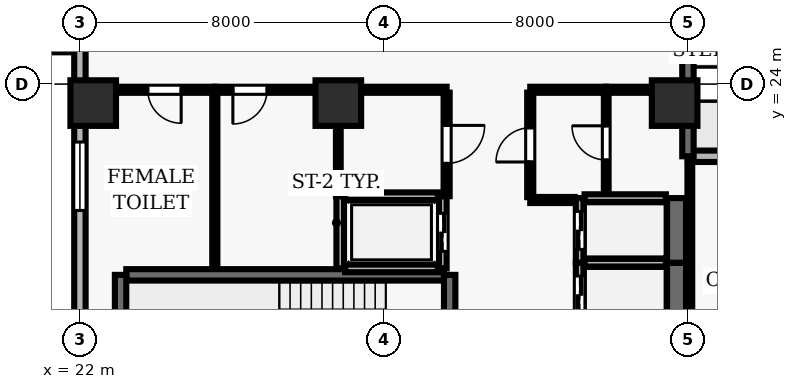
"""IFC4 building model, lengths in metres.
Left out: names, types, materials, properties, quantities, classifications, styles, units other than length and angle.
Written with IfcOpenShell. Run it as: python <this file> out.ifc"""

import sys

from ifc_helpers import new_model, si_unit, direction, frame, frame_2d, origin, origin_2d, place, context, subcontext, project, spatial, rectangle, extrude, element, fill, save


model = new_model("IFC4")
c1 = context("Model", 3, precision=1e-05, world=origin(), true_north=direction((0.0, 1.0)))
c2 = subcontext(c1, "Body", "Model", "MODEL_VIEW")
j1 = project(units=[si_unit("LENGTHUNIT", "METRE"), si_unit("PLANEANGLEUNIT", "RADIAN")], contexts=[c1])
p1 = place(None, origin())
s1 = spatial("IfcSite", under=j1, at=p1, CompositionType="ELEMENT")
p2 = place(p1, origin())
s2 = spatial("IfcBuilding", under=s1, at=p2, CompositionType="ELEMENT")
p3 = place(p2, frame((0.0, 0.0, 158.0)))
s3 = spatial("IfcBuildingStorey", under=s2, at=p3, CompositionType="ELEMENT", Elevation=158.0)
for number, where, z_axis, x_axis in (
    (1, (22.35, 23.5, 0.0), (0.0, 0.0, 1.0), (1.0, 0.0, 0.0)),
    (2, (28.8, 23.5, 0.0), (0.0, 0.0, 1.0), (1.0, 0.0, 0.0)),
    (3, (37.65, 23.5, 0.0), (0.0, 0.0, 1.0), (1.0, 0.0, 0.0)),
):
    element("IfcColumn", number, at=place(p3, frame(where, z_axis=z_axis, x_axis=x_axis)), inside=s3, PredefinedType="COLUMN", context=c2, shape_type="SweptSolid", body=[
        extrude(rectangle(XDim=1.2, YDim=1.2, at=origin_2d()), origin(), (0.0, 0.0, 1.0), 3.9),
    ])
p4 = place(p3, frame((43.541, 22.1, 0.0), z_axis=(0.0, 0.0, 1.0), x_axis=(-1.0, 0.0, 0.0)))
e4 = element("IfcWall", 4, at=p4, inside=s3, PredefinedType="SOLIDWALL", context=c2, shape_type="SweptSolid", body=[
    extrude(rectangle(XDim=5.541, YDim=0.3, at=frame_2d((2.771, 0.0))), origin(), (0.0, 0.0, 1.0), 3.69),
])
p5 = place(p4, frame((2.095, 0.0, 0.0)))
e5 = element("IfcOpeningElement", 5, at=p5, cuts=e4, PredefinedType="OPENING", context=c2, shape_type="SweptSolid", body=[
    extrude(rectangle(XDim=1.35, YDim=2.2, at=frame_2d((0.675, 1.1))), frame((0.0, 0.16, 0.0), z_axis=(0.0, -1.0, 0.0), x_axis=(1.0, 0.0, 0.0)), (0.0, 0.0, 1.0), 0.32),
])
p6 = place(p3, frame((38.0, 22.1, 0.0), z_axis=(0.0, 0.0, 1.0), x_axis=(0.0, 1.0, 0.0)))
e6 = element("IfcWall", 6, at=p6, inside=s3, PredefinedType="SOLIDWALL", context=c2, shape_type="SweptSolid", body=[
    extrude(rectangle(XDim=24.0, YDim=0.3, at=frame_2d((12.0, 0.0))), origin(), (0.0, 0.0, 1.0), 3.69),
])
p7 = place(p6, frame((10.125, 0.0, 0.0)))
e7 = element("IfcOpeningElement", 7, at=p7, cuts=e6, PredefinedType="OPENING", context=c2, shape_type="SweptSolid", body=[
    extrude(rectangle(XDim=1.0, YDim=2.2, at=frame_2d((0.5, 1.1))), frame((0.0, 0.16, 0.0), z_axis=(0.0, -1.0, 0.0), x_axis=(1.0, 0.0, 0.0)), (0.0, 0.0, 1.0), 0.32),
])
p8 = place(p6, frame((14.25, 0.0, 0.9)))
e8 = element("IfcOpeningElement", 8, at=p8, cuts=e6, PredefinedType="OPENING", context=c2, shape_type="SweptSolid", body=[
    extrude(rectangle(XDim=2.4, YDim=2.2, at=frame_2d((1.2, 1.1))), frame((0.0, 0.16, 0.0), z_axis=(0.0, -1.0, 0.0), x_axis=(1.0, 0.0, 0.0)), (0.0, 0.0, 1.0), 0.32),
])
p9 = place(p6, frame((19.8, 0.0, 0.9)))
e9 = element("IfcOpeningElement", 9, at=p9, cuts=e6, PredefinedType="OPENING", context=c2, shape_type="SweptSolid", body=[
    extrude(rectangle(XDim=2.4, YDim=2.2, at=frame_2d((1.2, 1.1))), frame((0.0, 0.16, 0.0), z_axis=(0.0, -1.0, 0.0), x_axis=(1.0, 0.0, 0.0)), (0.0, 0.0, 1.0), 0.32),
])
p10 = place(p3, frame((22.0, 46.1, 0.0), z_axis=(0.0, 0.0, 1.0), x_axis=(0.0, -1.0, 0.0)))
e10 = element("IfcWall", 10, at=p10, inside=s3, PredefinedType="SOLIDWALL", context=c2, shape_type="SweptSolid", body=[
    extrude(rectangle(XDim=43.6, YDim=0.3, at=frame_2d((21.8, 0.0))), origin(), (0.0, 0.0, 1.0), 3.69),
])
p11 = place(p10, frame((7.1, 0.0, 0.0)))
e11 = element("IfcOpeningElement", 11, at=p11, cuts=e10, PredefinedType="OPENING", context=c2, shape_type="SweptSolid", body=[
    extrude(rectangle(XDim=1.0, YDim=2.2, at=frame_2d((0.5, 1.1))), frame((0.0, 0.16, 0.0), z_axis=(0.0, -1.0, 0.0), x_axis=(1.0, 0.0, 0.0)), (0.0, 0.0, 1.0), 0.32),
])
p12 = place(p10, frame((1.825, 0.0, 0.9)))
e12 = element("IfcOpeningElement", 12, at=p12, cuts=e10, PredefinedType="OPENING", context=c2, shape_type="SweptSolid", body=[
    extrude(rectangle(XDim=1.8, YDim=1.6, at=frame_2d((0.9, 0.8))), frame((0.0, 0.16, 0.0), z_axis=(0.0, -1.0, 0.0), x_axis=(1.0, 0.0, 0.0)), (0.0, 0.0, 1.0), 0.32),
])
p13 = place(p10, frame((13.625, 0.0, 0.9)))
e13 = element("IfcOpeningElement", 13, at=p13, cuts=e10, PredefinedType="OPENING", context=c2, shape_type="SweptSolid", body=[
    extrude(rectangle(XDim=1.8, YDim=1.6, at=frame_2d((0.9, 0.8))), frame((0.0, 0.16, 0.0), z_axis=(0.0, -1.0, 0.0), x_axis=(1.0, 0.0, 0.0)), (0.0, 0.0, 1.0), 0.32),
])
p14 = place(p10, frame((17.725, 0.0, 0.9)))
e14 = element("IfcOpeningElement", 14, at=p14, cuts=e10, PredefinedType="OPENING", context=c2, shape_type="SweptSolid", body=[
    extrude(rectangle(XDim=1.8, YDim=1.6, at=frame_2d((0.9, 0.8))), frame((0.0, 0.16, 0.0), z_axis=(0.0, -1.0, 0.0), x_axis=(1.0, 0.0, 0.0)), (0.0, 0.0, 1.0), 0.32),
])
p15 = place(p10, frame((23.625, 0.0, 0.9)))
e15 = element("IfcOpeningElement", 15, at=p15, cuts=e10, PredefinedType="OPENING", context=c2, shape_type="SweptSolid", body=[
    extrude(rectangle(XDim=1.8, YDim=1.6, at=frame_2d((0.9, 0.8))), frame((0.0, 0.16, 0.0), z_axis=(0.0, -1.0, 0.0), x_axis=(1.0, 0.0, 0.0)), (0.0, 0.0, 1.0), 0.32),
])
p16 = place(p10, frame((28.625, 0.0, 0.9)))
e16 = element("IfcOpeningElement", 16, at=p16, cuts=e10, PredefinedType="OPENING", context=c2, shape_type="SweptSolid", body=[
    extrude(rectangle(XDim=1.8, YDim=1.6, at=frame_2d((0.9, 0.8))), frame((0.0, 0.16, 0.0), z_axis=(0.0, -1.0, 0.0), x_axis=(1.0, 0.0, 0.0)), (0.0, 0.0, 1.0), 0.32),
])
p17 = place(p10, frame((34.525, 0.0, 0.9)))
e17 = element("IfcOpeningElement", 17, at=p17, cuts=e10, PredefinedType="OPENING", context=c2, shape_type="SweptSolid", body=[
    extrude(rectangle(XDim=1.8, YDim=1.6, at=frame_2d((0.9, 0.8))), frame((0.0, 0.16, 0.0), z_axis=(0.0, -1.0, 0.0), x_axis=(1.0, 0.0, 0.0)), (0.0, 0.0, 1.0), 0.32),
])
p18 = place(p3, frame((31.58, 18.98, 0.0), z_axis=(0.0, 0.0, 1.0), x_axis=(-1.0, 0.0, 0.0)))
e18 = element("IfcWall", 18, at=p18, inside=s3, PredefinedType="SHEAR", context=c2, shape_type="SweptSolid", body=[
    extrude(rectangle(XDim=8.36, YDim=0.3, at=frame_2d((4.18, 0.0))), origin(), (0.0, 0.0, 1.0), 3.69),
])
p19 = place(p3, frame((23.07, 18.98, 0.0), z_axis=(0.0, 0.0, 1.0), x_axis=(0.0, -1.0, 0.0)))
e19 = element("IfcWall", 19, at=p19, inside=s3, PredefinedType="SHEAR", context=c2, shape_type="SweptSolid", body=[
    extrude(rectangle(XDim=3.51, YDim=0.3, at=frame_2d((1.755, 0.0))), origin(), (0.0, 0.0, 1.0), 3.69),
])
p20 = place(p3, frame((31.73, 15.47, 0.0), z_axis=(0.0, 0.0, 1.0), x_axis=(0.0, 1.0, 0.0)))
e20 = element("IfcWall", 20, at=p20, inside=s3, PredefinedType="SHEAR", context=c2, shape_type="SweptSolid", body=[
    extrude(rectangle(XDim=3.51, YDim=0.3, at=frame_2d((1.755, 0.0))), origin(), (0.0, 0.0, 1.0), 3.69),
])
p21 = place(p20, frame((1.18, 0.0, 0.0)))
e21 = element("IfcOpeningElement", 21, at=p21, cuts=e20, PredefinedType="OPENING", context=c2, shape_type="SweptSolid", body=[
    extrude(rectangle(XDim=1.15, YDim=2.15, at=frame_2d((0.575, 1.075))), frame((0.0, 0.16, 0.0), z_axis=(0.0, -1.0, 0.0), x_axis=(1.0, 0.0, 0.0)), (0.0, 0.0, 1.0), 0.32),
])
p22 = place(p3, frame((35.15, 19.3, 0.0), z_axis=(0.0, 0.0, 1.0), x_axis=(0.0, -1.0, 0.0)))
e22 = element("IfcWall", 22, at=p22, inside=s3, PredefinedType="SOLIDWALL", context=c2, shape_type="SweptSolid", body=[
    extrude(rectangle(XDim=1.7, YDim=0.2, at=frame_2d((0.85, 0.0))), origin(), (0.0, 0.0, 1.0), 3.69),
])
p23 = place(p22, frame((0.35, 0.0, 0.0)))
e23 = element("IfcOpeningElement", 23, at=p23, cuts=e22, PredefinedType="OPENING", context=c2, shape_type="SweptSolid", body=[
    extrude(rectangle(XDim=1.0, YDim=2.1, at=frame_2d((0.5, 1.05))), frame((0.0, 0.11, 0.0), z_axis=(0.0, -1.0, 0.0), x_axis=(1.0, 0.0, 0.0)), (0.0, 0.0, 1.0), 0.22),
])
p24 = place(p3, frame((37.7, 17.6, 0.0), z_axis=(0.0, 0.0, 1.0), x_axis=(0.0, 1.0, 0.0)))
e24 = element("IfcWall", 24, at=p24, inside=s3, PredefinedType="SHEAR", context=c2, shape_type="SweptSolid", body=[
    extrude(rectangle(XDim=1.7, YDim=0.5, at=frame_2d((0.85, 0.0))), origin(), (0.0, 0.0, 1.0), 3.69),
])
p25 = place(p3, frame((37.42, 19.3, 0.0), z_axis=(0.0, 0.0, 1.0), x_axis=(-1.0, 0.0, 0.0)))
e25 = element("IfcWall", 25, at=p25, inside=s3, PredefinedType="SOLIDWALL", context=c2, shape_type="SweptSolid", body=[
    extrude(rectangle(XDim=2.14, YDim=0.2, at=frame_2d((1.07, 0.0))), origin(), (0.0, 0.0, 1.0), 3.69),
])
p26 = place(p3, frame((35.15, 21.0, 0.0), z_axis=(0.0, 0.0, 1.0), x_axis=(0.0, -1.0, 0.0)))
e26 = element("IfcWall", 26, at=p26, inside=s3, PredefinedType="SOLIDWALL", context=c2, shape_type="SweptSolid", body=[
    extrude(rectangle(XDim=1.7, YDim=0.2, at=frame_2d((0.85, 0.0))), origin(), (0.0, 0.0, 1.0), 3.69),
])
p27 = place(p26, frame((0.35, 0.0, 0.0)))
e27 = element("IfcOpeningElement", 27, at=p27, cuts=e26, PredefinedType="OPENING", context=c2, shape_type="SweptSolid", body=[
    extrude(rectangle(XDim=1.0, YDim=2.1, at=frame_2d((0.5, 1.05))), frame((0.0, 0.11, 0.0), z_axis=(0.0, -1.0, 0.0), x_axis=(1.0, 0.0, 0.0)), (0.0, 0.0, 1.0), 0.22),
])
p28 = place(p3, frame((37.7, 19.3, 0.0), z_axis=(0.0, 0.0, 1.0), x_axis=(0.0, 1.0, 0.0)))
e28 = element("IfcWall", 28, at=p28, inside=s3, PredefinedType="SHEAR", context=c2, shape_type="SweptSolid", body=[
    extrude(rectangle(XDim=1.7, YDim=0.5, at=frame_2d((0.85, 0.0))), origin(), (0.0, 0.0, 1.0), 3.69),
])
p29 = place(p3, frame((37.42, 21.0, 0.0), z_axis=(0.0, 0.0, 1.0), x_axis=(-1.0, 0.0, 0.0)))
e29 = element("IfcWall", 29, at=p29, inside=s3, PredefinedType="SOLIDWALL", context=c2, shape_type="SweptSolid", body=[
    extrude(rectangle(XDim=2.14, YDim=0.2, at=frame_2d((1.07, 0.0))), origin(), (0.0, 0.0, 1.0), 3.69),
])
p30 = place(p3, frame((28.85, 21.05, 0.0), z_axis=(0.0, 0.0, 1.0), x_axis=(0.0, -1.0, 0.0)))
e30 = element("IfcWall", 30, at=p30, inside=s3, PredefinedType="SOLIDWALL", context=c2, shape_type="SweptSolid", body=[
    extrude(rectangle(XDim=1.9, YDim=0.2, at=frame_2d((0.95, 0.0))), origin(), (0.0, 0.0, 1.0), 3.69),
])
p31 = place(p3, frame((31.55, 19.15, 0.0), z_axis=(0.0, 0.0, 1.0), x_axis=(0.0, 1.0, 0.0)))
e31 = element("IfcWall", 31, at=p31, inside=s3, PredefinedType="SOLIDWALL", context=c2, shape_type="SweptSolid", body=[
    extrude(rectangle(XDim=1.9, YDim=0.2, at=frame_2d((0.95, 0.0))), origin(), (0.0, 0.0, 1.0), 3.69),
])
p32 = place(p31, frame((0.45, 0.0, 0.0)))
e32 = element("IfcOpeningElement", 32, at=p32, cuts=e31, PredefinedType="OPENING", context=c2, shape_type="SweptSolid", body=[
    extrude(rectangle(XDim=1.0, YDim=2.1, at=frame_2d((0.5, 1.05))), frame((0.0, 0.11, 0.0), z_axis=(0.0, -1.0, 0.0), x_axis=(1.0, 0.0, 0.0)), (0.0, 0.0, 1.0), 0.22),
])
for number, where, z_axis, x_axis in (
    (33, (28.98, 19.15, 0.0), (0.0, 0.0, 1.0), (1.0, 0.0, 0.0)),
    (34, (31.42, 21.05, 0.0), (0.0, 0.0, 1.0), (-1.0, 0.0, 0.0)),
):
    element("IfcWall", number, at=place(p3, frame(where, z_axis=z_axis, x_axis=x_axis)), inside=s3, PredefinedType="SOLIDWALL", context=c2, shape_type="SweptSolid", body=[
        extrude(rectangle(XDim=2.44, YDim=0.2, at=frame_2d((1.22, 0.0))), origin(), (0.0, 0.0, 1.0), 3.69),
    ])
p33 = place(p3, frame((25.55, 23.85, 0.0), z_axis=(0.0, 0.0, 1.0), x_axis=(-1.0, 0.0, 0.0)))
e35 = element("IfcWall", 35, at=p33, inside=s3, PredefinedType="PARTITIONING", context=c2, shape_type="SweptSolid", body=[
    extrude(rectangle(XDim=3.35, YDim=0.16, at=frame_2d((1.675, 0.0))), origin(), (0.0, 0.0, 1.0), 3.074),
])
p34 = place(p33, frame((0.885, 0.0, 0.0)))
e36 = element("IfcOpeningElement", 36, at=p34, cuts=e35, PredefinedType="OPENING", context=c2, shape_type="SweptSolid", body=[
    extrude(rectangle(XDim=0.88, YDim=2.1, at=frame_2d((0.44, 1.05))), frame((0.0, 0.09, 0.0), z_axis=(0.0, -1.0, 0.0), x_axis=(1.0, 0.0, 0.0)), (0.0, 0.0, 1.0), 0.18),
])
p35 = place(p3, frame((28.8, 23.85, 0.0), z_axis=(0.0, 0.0, 1.0), x_axis=(-1.0, 0.0, 0.0)))
e37 = element("IfcWall", 37, at=p35, inside=s3, PredefinedType="PARTITIONING", context=c2, shape_type="SweptSolid", body=[
    extrude(rectangle(XDim=3.25, YDim=0.16, at=frame_2d((1.625, 0.0))), origin(), (0.0, 0.0, 1.0), 3.074),
])
p36 = place(p35, frame((1.875, 0.0, 0.0)))
e38 = element("IfcOpeningElement", 38, at=p36, cuts=e37, PredefinedType="OPENING", context=c2, shape_type="SweptSolid", body=[
    extrude(rectangle(XDim=0.9, YDim=2.1, at=frame_2d((0.45, 1.05))), frame((0.0, 0.09, 0.0), z_axis=(0.0, -1.0, 0.0), x_axis=(1.0, 0.0, 0.0)), (0.0, 0.0, 1.0), 0.18),
])
p37 = place(p3, frame((31.65, 23.85, 0.0), z_axis=(0.0, 0.0, 1.0), x_axis=(-1.0, 0.0, 0.0)))
e39 = element("IfcWall", 39, at=p37, inside=s3, PredefinedType="PARTITIONING", context=c2, shape_type="SweptSolid", body=[
    extrude(rectangle(XDim=2.85, YDim=0.16, at=frame_2d((1.425, 0.0))), origin(), (0.0, 0.0, 1.0), 3.074),
])
p38 = place(p3, frame((35.02, 20.95, 0.0), z_axis=(0.0, 0.0, 1.0), x_axis=(-1.0, 0.0, 0.0)))
e40 = element("IfcWall", 40, at=p38, inside=s3, PredefinedType="PARTITIONING", context=c2, shape_type="SweptSolid", body=[
    extrude(rectangle(XDim=1.17, YDim=0.16, at=frame_2d((0.585, 0.0))), origin(), (0.0, 0.0, 1.0), 3.69),
])
for number, where, z_axis, x_axis in (
    (41, (35.85, 23.85, 0.0), (0.0, 0.0, 1.0), (-1.0, 0.0, 0.0)),
    (42, (37.85, 23.85, 0.0), (0.0, 0.0, 1.0), (-1.0, 0.0, 0.0)),
):
    element("IfcWall", number, at=place(p3, frame(where, z_axis=z_axis, x_axis=x_axis)), inside=s3, PredefinedType="PARTITIONING", context=c2, shape_type="SweptSolid", body=[
        extrude(rectangle(XDim=2.0, YDim=0.16, at=frame_2d((1.0, 0.0))), origin(), (0.0, 0.0, 1.0), 3.074),
    ])
p39 = place(p3, frame((25.55, 19.16, 0.0), z_axis=(0.0, 0.0, 1.0), x_axis=(0.0, 1.0, 0.0)))
e43 = element("IfcWall", 43, at=p39, inside=s3, PredefinedType="PARTITIONING", context=c2, shape_type="SweptSolid", body=[
    extrude(rectangle(XDim=4.615, YDim=0.135, at=frame_2d((2.308, 0.0))), origin(), (0.0, 0.0, 1.0), 3.69),
])
p40 = place(p3, frame((28.8, 23.775, 0.0), z_axis=(0.0, 0.0, 1.0), x_axis=(0.0, -1.0, 0.0)))
e44 = element("IfcWall", 44, at=p40, inside=s3, PredefinedType="PARTITIONING", context=c2, shape_type="SweptSolid", body=[
    extrude(rectangle(XDim=2.725, YDim=0.125, at=frame_2d((1.362, 0.0))), origin(), (0.0, 0.0, 1.0), 3.69),
])
p41 = place(p3, frame((31.65, 23.775, 0.0), z_axis=(0.0, 0.0, 1.0), x_axis=(0.0, -1.0, 0.0)))
e45 = element("IfcWall", 45, at=p41, inside=s3, PredefinedType="PARTITIONING", context=c2, shape_type="SweptSolid", body=[
    extrude(rectangle(XDim=2.725, YDim=0.16, at=frame_2d((1.362, 0.0))), origin(), (0.0, 0.0, 1.0), 3.69),
])
p42 = place(p41, frame((0.862, 0.0, 0.0)))
e46 = element("IfcOpeningElement", 46, at=p42, cuts=e45, PredefinedType="OPENING", context=c2, shape_type="SweptSolid", body=[
    extrude(rectangle(XDim=1.0, YDim=2.1, at=frame_2d((0.5, 1.05))), frame((0.0, 0.09, 0.0), z_axis=(0.0, -1.0, 0.0), x_axis=(1.0, 0.0, 0.0)), (0.0, 0.0, 1.0), 0.18),
])
p43 = place(p3, frame((33.85, 21.025, 0.0), z_axis=(0.0, 0.0, 1.0), x_axis=(0.0, 1.0, 0.0)))
e47 = element("IfcWall", 47, at=p43, inside=s3, PredefinedType="PARTITIONING", context=c2, shape_type="SweptSolid", body=[
    extrude(rectangle(XDim=2.75, YDim=0.16, at=frame_2d((1.375, 0.0))), origin(), (0.0, 0.0, 1.0), 3.69),
])
p44 = place(p43, frame((0.925, 0.0, 0.0)))
e48 = element("IfcOpeningElement", 48, at=p44, cuts=e47, PredefinedType="OPENING", context=c2, shape_type="SweptSolid", body=[
    extrude(rectangle(XDim=0.9, YDim=2.1, at=frame_2d((0.45, 1.05))), frame((0.0, 0.09, 0.0), z_axis=(0.0, -1.0, 0.0), x_axis=(1.0, 0.0, 0.0)), (0.0, 0.0, 1.0), 0.18),
])
p45 = place(p3, frame((35.85, 21.13, 0.0), z_axis=(0.0, 0.0, 1.0), x_axis=(0.0, 1.0, 0.0)))
e49 = element("IfcWall", 49, at=p45, inside=s3, PredefinedType="PARTITIONING", context=c2, shape_type="SweptSolid", body=[
    extrude(rectangle(XDim=2.645, YDim=0.125, at=frame_2d((1.323, 0.0))), origin(), (0.0, 0.0, 1.0), 3.69),
])
p46 = place(p45, frame((0.872, 0.0, 0.0)))
e50 = element("IfcOpeningElement", 50, at=p46, cuts=e49, PredefinedType="OPENING", context=c2, shape_type="SweptSolid", body=[
    extrude(rectangle(XDim=0.9, YDim=2.1, at=frame_2d((0.45, 1.05))), frame((0.0, 0.073, 0.0), z_axis=(0.0, -1.0, 0.0), x_axis=(1.0, 0.0, 0.0)), (0.0, 0.0, 1.0), 0.145),
])
p47 = place(p3, frame((38.05, 21.955, 0.0), z_axis=(0.0, 0.0, 1.0), x_axis=(0.0, -1.0, 0.0)))
e51 = element("IfcWall", 51, at=p47, inside=s3, PredefinedType="PARTITIONING", context=c2, shape_type="SweptSolid", body=[
    extrude(rectangle(XDim=5.88, YDim=0.125, at=frame_2d((2.94, 0.0))), origin(), (0.0, 0.0, 1.0), 3.074),
])
p48 = place(p15, origin())
e52 = element("IfcWindow", 52, at=p48, inside=s3, PartitioningType="SINGLE_PANEL", PredefinedType="WINDOW", context=c2, shape_type="SweptSolid", body=[
    extrude(rectangle(XDim=1.8, YDim=1.6, at=frame_2d((0.9, 0.8))), frame((0.0, 0.03, 0.0), z_axis=(0.0, -1.0, 0.0), x_axis=(1.0, 0.0, 0.0)), (0.0, 0.0, 1.0), 0.06),
])
fill(e15, e52)
p49 = place(p23, origin())
e53 = element("IfcDoor", 53, at=p49, inside=s3, OperationType="DOUBLE_DOOR_SLIDING", PredefinedType="DOOR", context=c2, shape_type="SweptSolid", body=[
    extrude(rectangle(XDim=1.0, YDim=2.1, at=frame_2d((0.5, 1.05))), frame((0.0, 0.025, 0.0), z_axis=(0.0, -1.0, 0.0), x_axis=(1.0, 0.0, 0.0)), (0.0, 0.0, 1.0), 0.05),
])
fill(e23, e53)
p50 = place(p27, origin())
e54 = element("IfcDoor", 54, at=p50, inside=s3, OperationType="DOUBLE_DOOR_SLIDING", PredefinedType="DOOR", context=c2, shape_type="SweptSolid", body=[
    extrude(rectangle(XDim=1.0, YDim=2.1, at=frame_2d((0.5, 1.05))), frame((0.0, 0.025, 0.0), z_axis=(0.0, -1.0, 0.0), x_axis=(1.0, 0.0, 0.0)), (0.0, 0.0, 1.0), 0.05),
])
fill(e27, e54)
p51 = place(p32, origin())
e55 = element("IfcDoor", 55, at=p51, inside=s3, OperationType="DOUBLE_DOOR_SLIDING", PredefinedType="DOOR", context=c2, shape_type="SweptSolid", body=[
    extrude(rectangle(XDim=1.0, YDim=2.1, at=frame_2d((0.5, 1.05))), frame((0.0, 0.025, 0.0), z_axis=(0.0, -1.0, 0.0), x_axis=(1.0, 0.0, 0.0)), (0.0, 0.0, 1.0), 0.05),
])
fill(e32, e55)
p52 = place(p44, origin())
e56 = element("IfcDoor", 56, at=p52, inside=s3, OperationType="SINGLE_SWING_LEFT", PredefinedType="DOOR", context=c2, shape_type="SweptSolid", body=[
    extrude(rectangle(XDim=0.9, YDim=2.1, at=frame_2d((0.45, 1.05))), frame((0.0, 0.025, 0.0), z_axis=(0.0, -1.0, 0.0), x_axis=(1.0, 0.0, 0.0)), (0.0, 0.0, 1.0), 0.05),
])
fill(e48, e56)
p53 = place(p46, origin())
e57 = element("IfcDoor", 57, at=p53, inside=s3, OperationType="SINGLE_SWING_RIGHT", PredefinedType="DOOR", context=c2, shape_type="SweptSolid", body=[
    extrude(rectangle(XDim=0.9, YDim=2.1, at=frame_2d((0.45, 1.05))), frame((0.0, 0.025, 0.0), z_axis=(0.0, -1.0, 0.0), x_axis=(1.0, 0.0, 0.0)), (0.0, 0.0, 1.0), 0.05),
])
fill(e50, e57)
p54 = place(p42, origin())
e58 = element("IfcDoor", 58, at=p54, inside=s3, OperationType="SINGLE_SWING_LEFT", PredefinedType="DOOR", context=c2, shape_type="SweptSolid", body=[
    extrude(rectangle(XDim=1.0, YDim=2.1, at=frame_2d((0.5, 1.05))), frame((0.0, 0.025, 0.0), z_axis=(0.0, -1.0, 0.0), x_axis=(1.0, 0.0, 0.0)), (0.0, 0.0, 1.0), 0.05),
])
fill(e46, e58)
p55 = place(p34, origin())
e59 = element("IfcDoor", 59, at=p55, inside=s3, OperationType="SINGLE_SWING_LEFT", PredefinedType="DOOR", context=c2, shape_type="SweptSolid", body=[
    extrude(rectangle(XDim=0.88, YDim=2.1, at=frame_2d((0.44, 1.05))), frame((0.0, 0.025, 0.0), z_axis=(0.0, -1.0, 0.0), x_axis=(1.0, 0.0, 0.0)), (0.0, 0.0, 1.0), 0.05),
])
fill(e36, e59)
p56 = place(p36, origin())
e60 = element("IfcDoor", 60, at=p56, inside=s3, OperationType="SINGLE_SWING_RIGHT", PredefinedType="DOOR", context=c2, shape_type="SweptSolid", body=[
    extrude(rectangle(XDim=0.9, YDim=2.1, at=frame_2d((0.45, 1.05))), frame((0.0, 0.025, 0.0), z_axis=(0.0, -1.0, 0.0), x_axis=(1.0, 0.0, 0.0)), (0.0, 0.0, 1.0), 0.05),
])
fill(e38, e60)
save(model, sys.argv[1])
